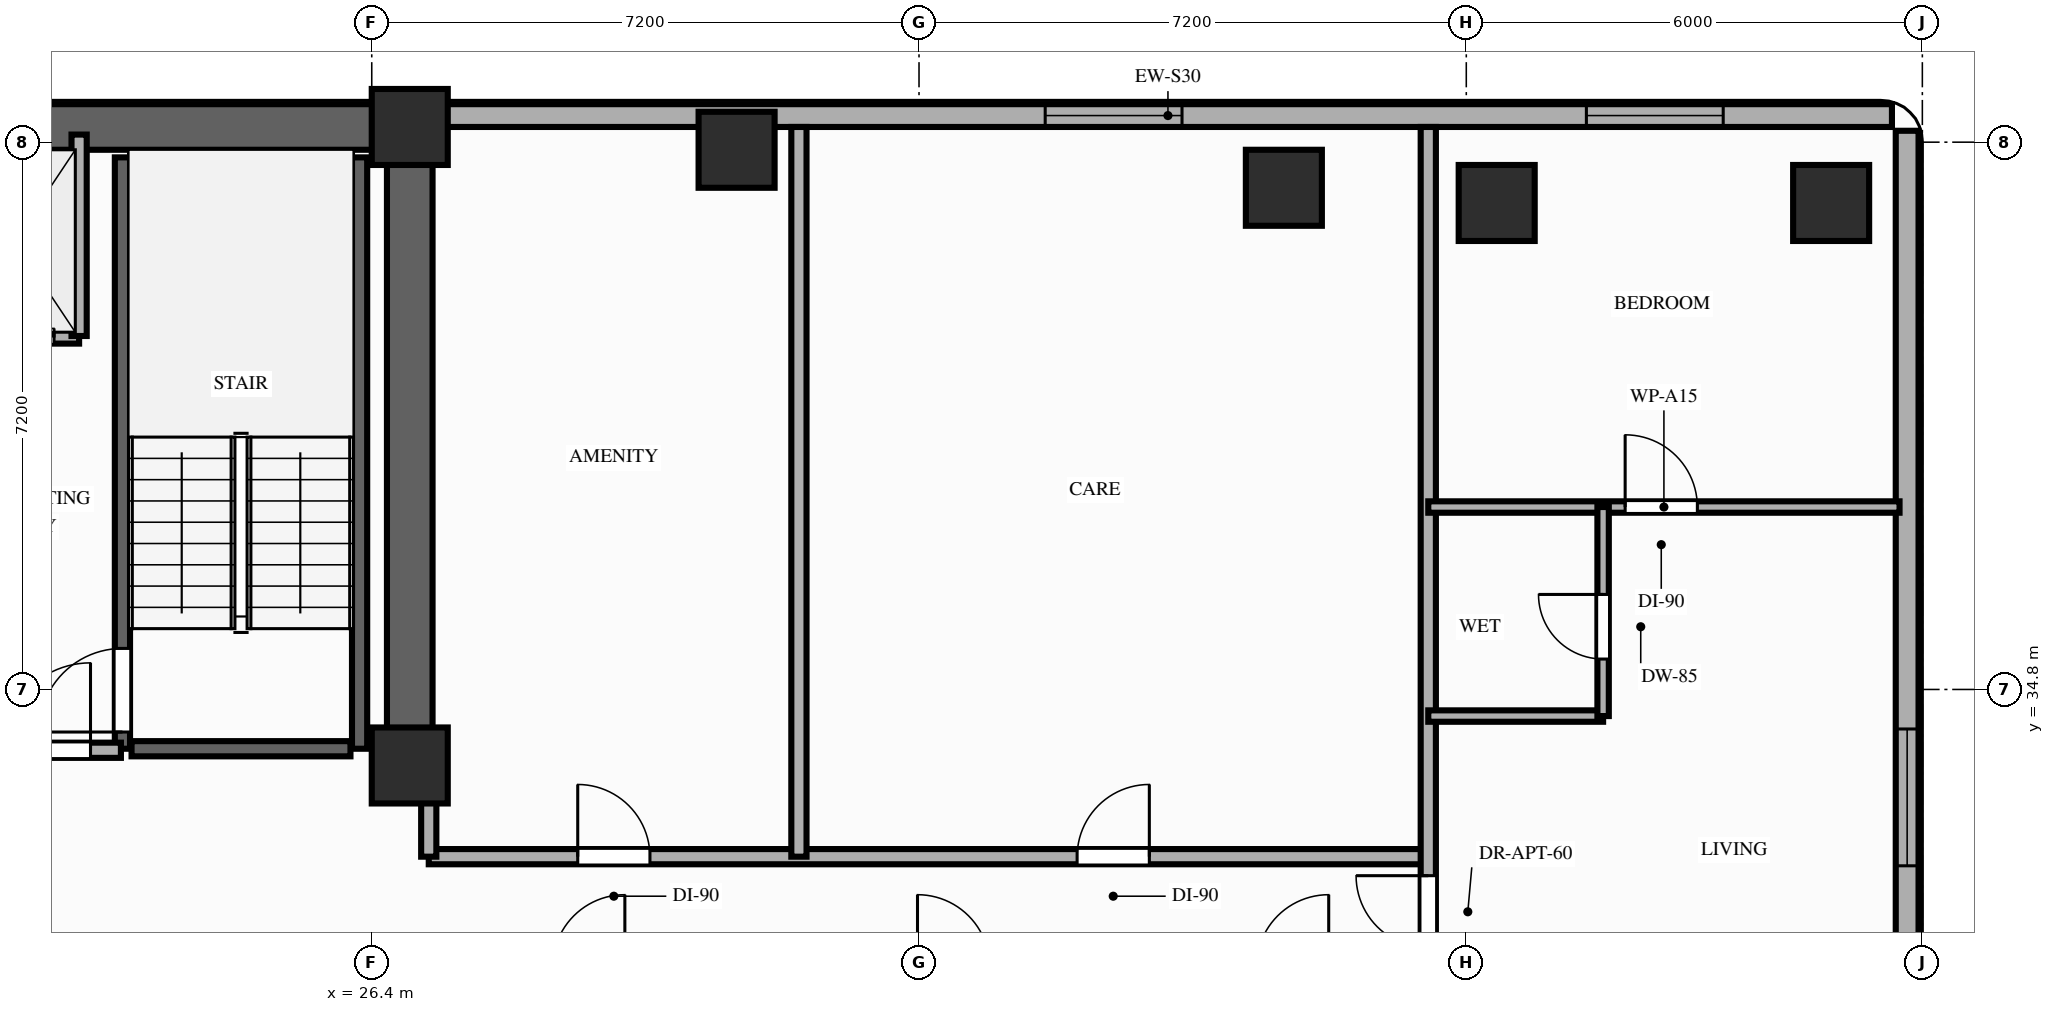
"""IFC4 building model, lengths in metres.
Left out: names, types, materials, properties, quantities, classifications, styles, units other than length and angle.
Written with IfcOpenShell. Run it as: python <this file> out.ifc"""

import sys

from ifc_helpers import new_model, si_unit, direction, frame, frame_2d, origin, origin_2d, place, context, subcontext, project, spatial, rectangle, extrude, element, fill, save


model = new_model("IFC4")
c1 = context("Model", 3, precision=1e-05, world=origin(), true_north=direction((0.0, 1.0)))
c2 = subcontext(c1, "Body", "Model", "MODEL_VIEW")
j1 = project(units=[si_unit("LENGTHUNIT", "METRE"), si_unit("PLANEANGLEUNIT", "RADIAN")], contexts=[c1])
p1 = place(None, origin())
s1 = spatial("IfcSite", under=j1, at=p1, CompositionType="ELEMENT")
p2 = place(p1, origin())
s2 = spatial("IfcBuilding", under=s1, at=p2, CompositionType="ELEMENT")
p3 = place(p2, frame((0.0, 0.0, 142.6)))
s3 = spatial("IfcBuildingStorey", under=s2, at=p3, CompositionType="ELEMENT", Elevation=142.6)
for number, where, z_axis, x_axis in (
    (1, (26.9, 33.8, 0.0), (0.0, 0.0, 1.0), (1.0, 0.0, 0.0)),
    (2, (26.9, 42.2, 0.0), (0.0, 0.0, 1.0), (1.0, 0.0, 0.0)),
    (3, (31.2, 41.9, 0.0), (0.0, 0.0, 1.0), (1.0, 0.0, 0.0)),
    (4, (38.4, 41.4, 0.0), (0.0, 0.0, 1.0), (1.0, 0.0, 0.0)),
    (5, (41.2, 41.2, 0.0), (0.0, 0.0, 1.0), (1.0, 0.0, 0.0)),
    (6, (45.6, 41.2, 0.0), (0.0, 0.0, 1.0), (1.0, 0.0, 0.0)),
):
    element("IfcColumn", number, at=place(p3, frame(where, z_axis=z_axis, x_axis=x_axis)), inside=s3, PredefinedType="COLUMN", context=c2, shape_type="SweptSolid", body=[
        extrude(rectangle(XDim=1.0, YDim=1.0, at=origin_2d()), origin(), (0.0, 0.0, 1.0), 3.2),
    ])
p4 = place(p3, frame((46.4, 42.35, 0.0), z_axis=(0.0, 0.0, 1.0), x_axis=(-1.0, 0.0, 0.0)))
e7 = element("IfcWall", 7, at=p4, inside=s3, PredefinedType="STANDARD", context=c2, shape_type="SweptSolid", body=[
    extrude(rectangle(XDim=19.05, YDim=0.3, at=frame_2d((9.525, 0.0))), origin(), (0.0, 0.0, 1.0), 2.45),
])
p5 = place(p4, frame((2.22, 0.0, 0.85)))
e8 = element("IfcOpeningElement", 8, at=p5, cuts=e7, PredefinedType="OPENING", context=c2, shape_type="SweptSolid", body=[
    extrude(rectangle(XDim=1.8, YDim=1.35, at=frame_2d((0.9, 0.675))), frame((0.0, 0.16, 0.0), z_axis=(0.0, -1.0, 0.0), x_axis=(1.0, 0.0, 0.0)), (0.0, 0.0, 1.0), 0.32),
])
p6 = place(p4, frame((9.34, 0.0, 0.85)))
e9 = element("IfcOpeningElement", 9, at=p6, cuts=e7, PredefinedType="OPENING", context=c2, shape_type="SweptSolid", body=[
    extrude(rectangle(XDim=1.8, YDim=1.35, at=frame_2d((0.9, 0.675))), frame((0.0, 0.16, 0.0), z_axis=(0.0, -1.0, 0.0), x_axis=(1.0, 0.0, 0.0)), (0.0, 0.0, 1.0), 0.32),
])
p7 = place(p3, frame((46.6, 26.8, 0.0), z_axis=(0.0, 0.0, 1.0), x_axis=(0.0, 1.0, 0.0)))
e10 = element("IfcWall", 10, at=p7, inside=s3, PredefinedType="STANDARD", context=c2, shape_type="SweptSolid", body=[
    extrude(rectangle(XDim=15.35, YDim=0.3, at=frame_2d((7.675, 0.0))), origin(), (0.0, 0.0, 1.0), 3.02),
])
p8 = place(p7, frame((5.68, 0.0, 0.85)))
e11 = element("IfcOpeningElement", 11, at=p8, cuts=e10, PredefinedType="OPENING", context=c2, shape_type="SweptSolid", body=[
    extrude(rectangle(XDim=1.8, YDim=1.75, at=frame_2d((0.9, 0.875))), frame((0.0, 0.16, 0.0), z_axis=(0.0, -1.0, 0.0), x_axis=(1.0, 0.0, 0.0)), (0.0, 0.0, 1.0), 0.32),
])
p9 = place(p3, frame((6.45, 42.2, 0.0), z_axis=(0.0, 0.0, 1.0), x_axis=(1.0, 0.0, 0.0)))
e12 = element("IfcWall", 12, at=p9, inside=s3, PredefinedType="SHEAR", context=c2, shape_type="SweptSolid", body=[
    extrude(rectangle(XDim=20.45, YDim=0.6, at=frame_2d((10.225, 0.0))), origin(), (0.0, 0.0, 1.0), 3.02),
])
p10 = place(p3, frame((26.9, 33.8, 0.0), z_axis=(0.0, 0.0, 1.0), x_axis=(0.0, 1.0, 0.0)))
e13 = element("IfcWall", 13, at=p10, inside=s3, PredefinedType="SHEAR", context=c2, shape_type="SweptSolid", body=[
    extrude(rectangle(XDim=7.95, YDim=0.6, at=frame_2d((3.975, 0.0))), origin(), (0.0, 0.0, 1.0), 3.02),
])
p11 = place(p3, frame((23.12, 34.02, 0.0), z_axis=(0.0, 0.0, 1.0), x_axis=(0.0, 1.0, 0.0)))
e14 = element("IfcWall", 14, at=p11, inside=s3, PredefinedType="SHEAR", context=c2, shape_type="SweptSolid", body=[
    extrude(rectangle(XDim=7.78, YDim=0.2, at=frame_2d((3.89, 0.0))), origin(), (0.0, 0.0, 1.0), 3.02),
])
p12 = place(p11, frame((0.22, 0.0, 0.0)))
e15 = element("IfcOpeningElement", 15, at=p12, cuts=e14, PredefinedType="OPENING", context=c2, shape_type="SweptSolid", body=[
    extrude(rectangle(XDim=1.1, YDim=2.15, at=frame_2d((0.55, 1.075))), frame((0.0, 0.11, 0.0), z_axis=(0.0, -1.0, 0.0), x_axis=(1.0, 0.0, 0.0)), (0.0, 0.0, 1.0), 0.22),
])
p13 = place(p3, frame((26.24, 34.02, 0.0), z_axis=(0.0, 0.0, 1.0), x_axis=(0.0, 1.0, 0.0)))
e16 = element("IfcWall", 16, at=p13, inside=s3, PredefinedType="SHEAR", context=c2, shape_type="SweptSolid", body=[
    extrude(rectangle(XDim=7.78, YDim=0.2, at=frame_2d((3.89, 0.0))), origin(), (0.0, 0.0, 1.0), 3.02),
])
p14 = place(p3, frame((23.24, 34.02, 0.0), z_axis=(0.0, 0.0, 1.0), x_axis=(1.0, 0.0, 0.0)))
e17 = element("IfcWall", 17, at=p14, inside=s3, PredefinedType="SHEAR", context=c2, shape_type="SweptSolid", body=[
    extrude(rectangle(XDim=2.88, YDim=0.2, at=frame_2d((1.44, 0.0))), origin(), (0.0, 0.0, 1.0), 3.02),
])
p15 = place(p3, frame((20.85, 39.45, 0.0), z_axis=(0.0, 0.0, 1.0), x_axis=(1.0, 0.0, 0.0)))
e18 = element("IfcWall", 18, at=p15, inside=s3, PredefinedType="MOVABLE", context=c2, shape_type="SweptSolid", body=[
    extrude(rectangle(XDim=1.7, YDim=0.2, at=frame_2d((0.85, 0.0))), origin(), (0.0, 0.0, 1.0), 3.02),
])
p16 = place(p15, frame((0.32, 0.0, 0.0)))
e19 = element("IfcOpeningElement", 19, at=p16, cuts=e18, PredefinedType="OPENING", context=c2, shape_type="SweptSolid", body=[
    extrude(rectangle(XDim=1.05, YDim=2.15, at=frame_2d((0.525, 1.075))), frame((0.0, 0.11, 0.0), z_axis=(0.0, -1.0, 0.0), x_axis=(1.0, 0.0, 0.0)), (0.0, 0.0, 1.0), 0.22),
])
p17 = place(p3, frame((22.55, 39.45, 0.0), z_axis=(0.0, 0.0, 1.0), x_axis=(0.0, 1.0, 0.0)))
e20 = element("IfcWall", 20, at=p17, inside=s3, PredefinedType="MOVABLE", context=c2, shape_type="SweptSolid", body=[
    extrude(rectangle(XDim=2.65, YDim=0.2, at=frame_2d((1.325, 0.0))), origin(), (0.0, 0.0, 1.0), 2.45),
])
p18 = place(p3, frame((20.5, 34.0, 0.0), z_axis=(0.0, 0.0, 1.0), x_axis=(1.0, 0.0, 0.0)))
e21 = element("IfcWall", 21, at=p18, inside=s3, PredefinedType="PARTITIONING", context=c2, shape_type="SweptSolid", body=[
    extrude(rectangle(XDim=2.6, YDim=0.2, at=frame_2d((1.3, 0.0))), origin(), (0.0, 0.0, 1.0), 2.45),
])
p19 = place(p18, frame((1.05, 0.0, 0.0)))
e22 = element("IfcOpeningElement", 22, at=p19, cuts=e21, PredefinedType="OPENING", context=c2, shape_type="SweptSolid", body=[
    extrude(rectangle(XDim=1.15, YDim=2.15, at=frame_2d((0.575, 1.075))), frame((0.0, 0.11, 0.0), z_axis=(0.0, -1.0, 0.0), x_axis=(1.0, 0.0, 0.0)), (0.0, 0.0, 1.0), 0.22),
])
p20 = place(p3, frame((27.15, 32.6, 0.0), z_axis=(0.0, 0.0, 1.0), x_axis=(1.0, 0.0, 0.0)))
e23 = element("IfcWall", 23, at=p20, inside=s3, PredefinedType="PARTITIONING", context=c2, shape_type="SweptSolid", body=[
    extrude(rectangle(XDim=13.15, YDim=0.2, at=frame_2d((6.575, 0.0))), origin(), (0.0, 0.0, 1.0), 2.45),
])
p21 = place(p20, frame((1.96, 0.0, 0.0)))
e24 = element("IfcOpeningElement", 24, at=p21, cuts=e23, PredefinedType="OPENING", context=c2, shape_type="SweptSolid", body=[
    extrude(rectangle(XDim=0.95, YDim=2.15, at=frame_2d((0.475, 1.075))), frame((0.0, 0.11, 0.0), z_axis=(0.0, -1.0, 0.0), x_axis=(1.0, 0.0, 0.0)), (0.0, 0.0, 1.0), 0.22),
])
p22 = place(p20, frame((8.53, 0.0, 0.0)))
e25 = element("IfcOpeningElement", 25, at=p22, cuts=e23, PredefinedType="OPENING", context=c2, shape_type="SweptSolid", body=[
    extrude(rectangle(XDim=0.95, YDim=2.15, at=frame_2d((0.475, 1.075))), frame((0.0, 0.11, 0.0), z_axis=(0.0, -1.0, 0.0), x_axis=(1.0, 0.0, 0.0)), (0.0, 0.0, 1.0), 0.22),
])
p23 = place(p3, frame((27.15, 32.6, 0.0), z_axis=(0.0, 0.0, 1.0), x_axis=(0.0, 1.0, 0.0)))
e26 = element("IfcWall", 26, at=p23, inside=s3, PredefinedType="PARTITIONING", context=c2, shape_type="SweptSolid", body=[
    extrude(rectangle(XDim=1.08, YDim=0.2, at=frame_2d((0.54, 0.0))), origin(), (0.0, 0.0, 1.0), 2.45),
])
p24 = place(p3, frame((40.3, 26.75, 0.0), z_axis=(0.0, 0.0, 1.0), x_axis=(0.0, 1.0, 0.0)))
e27 = element("IfcWall", 27, at=p24, inside=s3, PredefinedType="PARTITIONING", context=c2, shape_type="SweptSolid", body=[
    extrude(rectangle(XDim=15.45, YDim=0.2, at=frame_2d((7.725, 0.0))), origin(), (0.0, 0.0, 1.0), 2.45),
])
p25 = place(p24, frame((4.65, 0.0, 0.0)))
e28 = element("IfcOpeningElement", 28, at=p25, cuts=e27, PredefinedType="OPENING", context=c2, shape_type="SweptSolid", body=[
    extrude(rectangle(XDim=0.95, YDim=2.15, at=frame_2d((0.475, 1.075))), frame((0.0, 0.11, 0.0), z_axis=(0.0, -1.0, 0.0), x_axis=(1.0, 0.0, 0.0)), (0.0, 0.0, 1.0), 0.22),
])
p26 = place(p3, frame((40.3, 37.2, 0.0), z_axis=(0.0, 0.0, 1.0), x_axis=(1.0, 0.0, 0.0)))
e29 = element("IfcWall", 29, at=p26, inside=s3, PredefinedType="PARTITIONING", context=c2, shape_type="SweptSolid", body=[
    extrude(rectangle(XDim=6.2, YDim=0.15, at=frame_2d((3.1, 0.0))), origin(), (0.0, 0.0, 1.0), 2.45),
])
p27 = place(p26, frame((2.59, 0.0, 0.0)))
e30 = element("IfcOpeningElement", 30, at=p27, cuts=e29, PredefinedType="OPENING", context=c2, shape_type="SweptSolid", body=[
    extrude(rectangle(XDim=0.95, YDim=2.15, at=frame_2d((0.475, 1.075))), frame((0.0, 0.085, 0.0), z_axis=(0.0, -1.0, 0.0), x_axis=(1.0, 0.0, 0.0)), (0.0, 0.0, 1.0), 0.17),
])
p28 = place(p3, frame((40.3, 34.45, 0.0), z_axis=(0.0, 0.0, 1.0), x_axis=(1.0, 0.0, 0.0)))
e31 = element("IfcWall", 31, at=p28, inside=s3, PredefinedType="PARTITIONING", context=c2, shape_type="SweptSolid", body=[
    extrude(rectangle(XDim=2.3, YDim=0.15, at=frame_2d((1.15, 0.0))), origin(), (0.0, 0.0, 1.0), 2.45),
])
p29 = place(p3, frame((42.6, 34.45, 0.0), z_axis=(0.0, 0.0, 1.0), x_axis=(0.0, 1.0, 0.0)))
e32 = element("IfcWall", 32, at=p29, inside=s3, PredefinedType="PARTITIONING", context=c2, shape_type="SweptSolid", body=[
    extrude(rectangle(XDim=2.75, YDim=0.15, at=frame_2d((1.375, 0.0))), origin(), (0.0, 0.0, 1.0), 2.61),
])
p30 = place(p29, frame((0.75, 0.0, 0.0)))
e33 = element("IfcOpeningElement", 33, at=p30, cuts=e32, PredefinedType="OPENING", context=c2, shape_type="SweptSolid", body=[
    extrude(rectangle(XDim=0.85, YDim=2.1, at=frame_2d((0.425, 1.05))), frame((0.0, 0.085, 0.0), z_axis=(0.0, -1.0, 0.0), x_axis=(1.0, 0.0, 0.0)), (0.0, 0.0, 1.0), 0.17),
])
p31 = place(p3, frame((32.02, 32.6, 0.0), z_axis=(0.0, 0.0, 1.0), x_axis=(0.0, 1.0, 0.0)))
e34 = element("IfcWall", 34, at=p31, inside=s3, PredefinedType="PARTITIONING", context=c2, shape_type="SweptSolid", body=[
    extrude(rectangle(XDim=9.6, YDim=0.2, at=frame_2d((4.8, 0.0))), origin(), (0.0, 0.0, 1.0), 2.45),
])
p32 = place(p8, origin())
e35 = element("IfcWindow", 35, at=p32, inside=s3, PartitioningType="SINGLE_PANEL", PredefinedType="WINDOW", context=c2, shape_type="SweptSolid", body=[
    extrude(rectangle(XDim=1.8, YDim=1.75, at=frame_2d((0.9, 0.875))), frame((0.0, 0.03, 0.0), z_axis=(0.0, -1.0, 0.0), x_axis=(1.0, 0.0, 0.0)), (0.0, 0.0, 1.0), 0.06),
])
fill(e11, e35)
p33 = place(p5, origin())
e36 = element("IfcWindow", 36, at=p33, inside=s3, PartitioningType="SINGLE_PANEL", PredefinedType="WINDOW", context=c2, shape_type="SweptSolid", body=[
    extrude(rectangle(XDim=1.8, YDim=1.35, at=frame_2d((0.9, 0.675))), frame((0.0, 0.03, 0.0), z_axis=(0.0, -1.0, 0.0), x_axis=(1.0, 0.0, 0.0)), (0.0, 0.0, 1.0), 0.06),
])
fill(e8, e36)
p34 = place(p6, origin())
e37 = element("IfcWindow", 37, at=p34, inside=s3, PartitioningType="SINGLE_PANEL", PredefinedType="WINDOW", context=c2, shape_type="SweptSolid", body=[
    extrude(rectangle(XDim=1.8, YDim=1.35, at=frame_2d((0.9, 0.675))), frame((0.0, 0.03, 0.0), z_axis=(0.0, -1.0, 0.0), x_axis=(1.0, 0.0, 0.0)), (0.0, 0.0, 1.0), 0.06),
])
fill(e9, e37)
p35 = place(p12, origin())
e38 = element("IfcDoor", 38, at=p35, inside=s3, OperationType="SINGLE_SWING_LEFT", PredefinedType="DOOR", context=c2, shape_type="SweptSolid", body=[
    extrude(rectangle(XDim=1.1, YDim=2.15, at=frame_2d((0.55, 1.075))), frame((0.0, 0.025, 0.0), z_axis=(0.0, -1.0, 0.0), x_axis=(1.0, 0.0, 0.0)), (0.0, 0.0, 1.0), 0.05),
])
fill(e15, e38)
p36 = place(p16, origin())
e39 = element("IfcDoor", 39, at=p36, inside=s3, OperationType="SLIDING_TO_LEFT", PredefinedType="DOOR", context=c2, shape_type="SweptSolid", body=[
    extrude(rectangle(XDim=1.05, YDim=2.15, at=frame_2d((0.525, 1.075))), frame((0.0, 0.025, 0.0), z_axis=(0.0, -1.0, 0.0), x_axis=(1.0, 0.0, 0.0)), (0.0, 0.0, 1.0), 0.05),
])
fill(e19, e39)
p37 = place(p19, origin())
e40 = element("IfcDoor", 40, at=p37, inside=s3, OperationType="SINGLE_SWING_RIGHT", PredefinedType="DOOR", context=c2, shape_type="SweptSolid", body=[
    extrude(rectangle(XDim=1.15, YDim=2.15, at=frame_2d((0.575, 1.075))), frame((0.0, 0.025, 0.0), z_axis=(0.0, -1.0, 0.0), x_axis=(1.0, 0.0, 0.0)), (0.0, 0.0, 1.0), 0.05),
])
fill(e22, e40)
p38 = place(p25, origin())
e41 = element("IfcDoor", 41, at=p38, inside=s3, OperationType="SINGLE_SWING_RIGHT", PredefinedType="DOOR", context=c2, shape_type="SweptSolid", body=[
    extrude(rectangle(XDim=0.95, YDim=2.15, at=frame_2d((0.475, 1.075))), frame((0.0, 0.025, 0.0), z_axis=(0.0, -1.0, 0.0), x_axis=(1.0, 0.0, 0.0)), (0.0, 0.0, 1.0), 0.05),
])
fill(e28, e41)
p39 = place(p27, origin())
e42 = element("IfcDoor", 42, at=p39, inside=s3, OperationType="SINGLE_SWING_LEFT", PredefinedType="DOOR", context=c2, shape_type="SweptSolid", body=[
    extrude(rectangle(XDim=0.95, YDim=2.15, at=frame_2d((0.475, 1.075))), frame((0.0, 0.025, 0.0), z_axis=(0.0, -1.0, 0.0), x_axis=(1.0, 0.0, 0.0)), (0.0, 0.0, 1.0), 0.05),
])
fill(e30, e42)
p40 = place(p30, origin())
e43 = element("IfcDoor", 43, at=p40, inside=s3, OperationType="SINGLE_SWING_RIGHT", PredefinedType="DOOR", context=c2, shape_type="SweptSolid", body=[
    extrude(rectangle(XDim=0.85, YDim=2.1, at=frame_2d((0.425, 1.05))), frame((0.0, 0.025, 0.0), z_axis=(0.0, -1.0, 0.0), x_axis=(1.0, 0.0, 0.0)), (0.0, 0.0, 1.0), 0.05),
])
fill(e33, e43)
p41 = place(p21, origin())
e44 = element("IfcDoor", 44, at=p41, inside=s3, OperationType="SINGLE_SWING_LEFT", PredefinedType="DOOR", context=c2, shape_type="SweptSolid", body=[
    extrude(rectangle(XDim=0.95, YDim=2.15, at=frame_2d((0.475, 1.075))), frame((0.0, 0.025, 0.0), z_axis=(0.0, -1.0, 0.0), x_axis=(1.0, 0.0, 0.0)), (0.0, 0.0, 1.0), 0.05),
])
fill(e24, e44)
p42 = place(p22, origin())
e45 = element("IfcDoor", 45, at=p42, inside=s3, OperationType="SINGLE_SWING_RIGHT", PredefinedType="DOOR", context=c2, shape_type="SweptSolid", body=[
    extrude(rectangle(XDim=0.95, YDim=2.15, at=frame_2d((0.475, 1.075))), frame((0.0, 0.025, 0.0), z_axis=(0.0, -1.0, 0.0), x_axis=(1.0, 0.0, 0.0)), (0.0, 0.0, 1.0), 0.05),
])
fill(e25, e45)
save(model, sys.argv[1])
